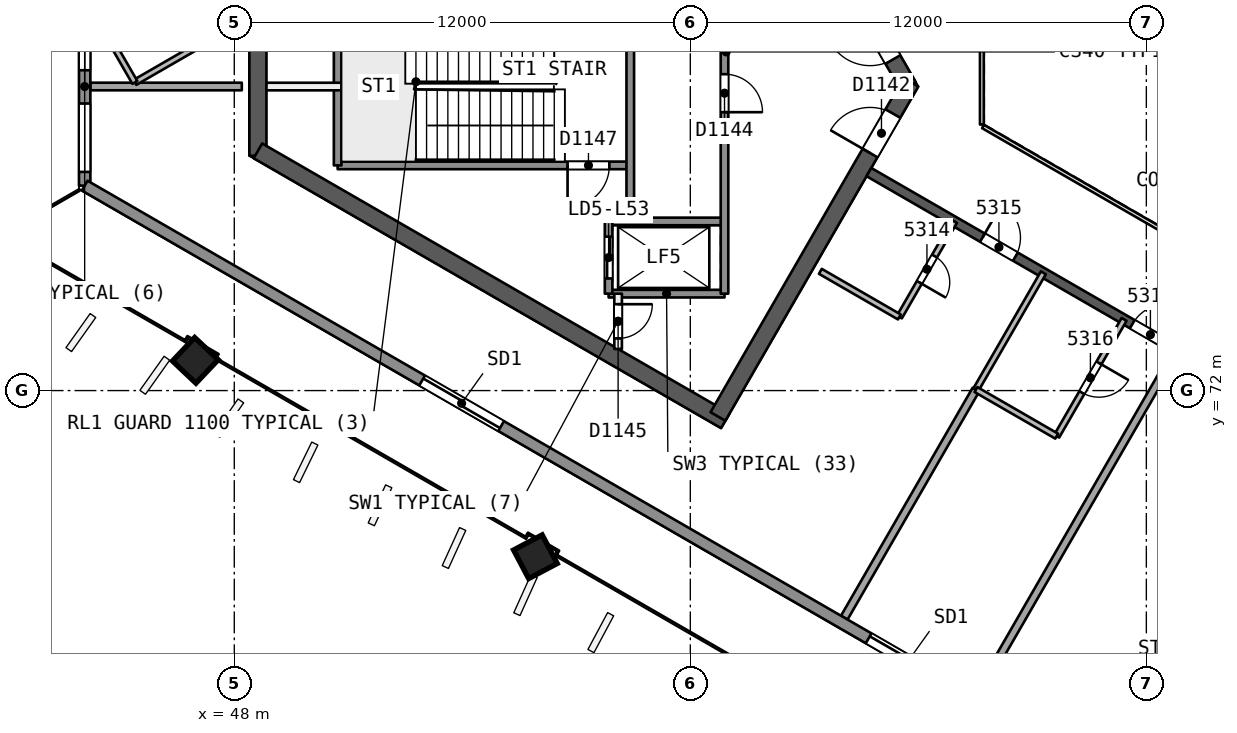
"""IFC4 building model, lengths in metres.
Left out: names, types, materials, properties, quantities, classifications, styles, units other than length and angle.
Written with IfcOpenShell. Run it as: python <this file> out.ifc"""

import sys

from ifc_helpers import new_model, si_unit, direction, frame, frame_2d, origin, origin_2d, place, context, subcontext, project, spatial, rectangle, extrude, element, fill, save


model = new_model("IFC4")
c1 = context("Model", 3, precision=1e-05, world=origin(), true_north=direction((0.0, 1.0)))
c2 = subcontext(c1, "Body", "Model", "MODEL_VIEW")
j1 = project(units=[si_unit("LENGTHUNIT", "METRE"), si_unit("PLANEANGLEUNIT", "RADIAN")], contexts=[c1])
p1 = place(None, origin())
s1 = spatial("IfcSite", under=j1, at=p1, CompositionType="ELEMENT")
p2 = place(p1, origin())
s2 = spatial("IfcBuilding", under=s1, at=p2, CompositionType="ELEMENT")
p3 = place(p2, frame((0.0, 0.0, 216.9)))
s3 = spatial("IfcBuildingStorey", under=s2, at=p3, CompositionType="ELEMENT", Elevation=216.9)
p4 = place(p3, frame((65.74, 80.0, 0.0), z_axis=(0.0, 0.0, 1.0), x_axis=(-0.499991857942, 0.866030104553, 0.0)))
e1 = element("IfcWall", 1, at=p4, inside=s3, PredefinedType="SHEAR", context=c2, shape_type="SweptSolid", body=[
    extrude(rectangle(XDim=10.25, YDim=0.45, at=frame_2d((5.125, 0.0))), origin(), (0.0, 0.0, 1.0), 3.7),
])
p5 = place(p4, frame((0.82, 0.0, 0.0)))
e2 = element("IfcOpeningElement", 2, at=p5, cuts=e1, PredefinedType="OPENING", context=c2, shape_type="SweptSolid", body=[
    extrude(rectangle(XDim=1.2, YDim=2.1, at=frame_2d((0.6, 1.05))), frame((0.0, 0.235, 0.0), z_axis=(0.0, -1.0, 0.0), x_axis=(1.0, 0.0, 0.0)), (0.0, 0.0, 1.0), 0.471),
])
p6 = place(p3, frame((48.622, 81.693, 0.0), z_axis=(0.0, 0.0, 1.0), x_axis=(0.0, -1.0, 0.0)))
e3 = element("IfcWall", 3, at=p6, inside=s3, PredefinedType="SHEAR", context=c2, shape_type="SweptSolid", body=[
    extrude(rectangle(XDim=3.515, YDim=0.45, at=frame_2d((1.758, 0.0))), origin(), (0.0, 0.0, 1.0), 3.7),
])
p7 = place(p3, frame((48.622, 78.307, 0.0), z_axis=(0.0, 0.0, 1.0), x_axis=(0.86602701116, -0.499997215934, 0.0)))
e4 = element("IfcWall", 4, at=p7, inside=s3, PredefinedType="SHEAR", context=c2, shape_type="SweptSolid", body=[
    extrude(rectangle(XDim=14.204, YDim=0.45, at=frame_2d((7.102, 0.0))), origin(), (0.0, 0.0, 1.0), 3.7),
])
p8 = place(p3, frame((60.728, 71.318, 0.0), z_axis=(0.0, 0.0, 1.0), x_axis=(0.500012416173, 0.866018235185, 0.0)))
e5 = element("IfcWall", 5, at=p8, inside=s3, PredefinedType="SHEAR", context=c2, shape_type="SweptSolid", body=[
    extrude(rectangle(XDim=10.155, YDim=0.45, at=frame_2d((5.078, 0.0))), origin(), (0.0, 0.0, 1.0), 3.7),
])
p9 = place(p8, frame((8.005, 0.0, 0.0)))
e6 = element("IfcOpeningElement", 6, at=p9, cuts=e5, PredefinedType="OPENING", context=c2, shape_type="SweptSolid", body=[
    extrude(rectangle(XDim=1.2, YDim=2.1, at=frame_2d((0.6, 1.05))), frame((0.0, 0.235, 0.0), z_axis=(0.0, -1.0, 0.0), x_axis=(1.0, 0.0, 0.0)), (0.0, 0.0, 1.0), 0.471),
])
p10 = place(p3, frame((64.7, 77.748, 0.0), z_axis=(0.0, 0.0, 1.0), x_axis=(0.866026492143, -0.499998114903, 0.0)))
e7 = element("IfcWall", 7, at=p10, inside=s3, PredefinedType="SHEAR", context=c2, shape_type="SweptSolid", body=[
    extrude(rectangle(XDim=15.588, YDim=0.25, at=frame_2d((7.794, 0.0))), origin(), (0.0, 0.0, 1.0), 3.3),
])
p11 = place(p10, frame((3.45, 0.0, 0.0)))
e8 = element("IfcOpeningElement", 8, at=p11, cuts=e7, PredefinedType="OPENING", context=c2, shape_type="SweptSolid", body=[
    extrude(rectangle(XDim=1.0, YDim=2.1, at=frame_2d((0.5, 1.05))), frame((0.0, 0.135, 0.0), z_axis=(0.0, -1.0, 0.0), x_axis=(1.0, 0.0, 0.0)), (0.0, 0.0, 1.0), 0.271),
])
p12 = place(p10, frame((8.003, 0.0, 0.0)))
e9 = element("IfcOpeningElement", 9, at=p12, cuts=e7, PredefinedType="OPENING", context=c2, shape_type="SweptSolid", body=[
    extrude(rectangle(XDim=1.1, YDim=2.1, at=frame_2d((0.55, 1.05))), frame((0.0, 0.135, 0.0), z_axis=(0.0, -1.0, 0.0), x_axis=(1.0, 0.0, 0.0)), (0.0, 0.0, 1.0), 0.271),
])
p13 = place(p10, frame((11.971, 0.0, 0.0)))
e10 = element("IfcOpeningElement", 10, at=p13, cuts=e7, PredefinedType="OPENING", context=c2, shape_type="SweptSolid", body=[
    extrude(rectangle(XDim=1.0, YDim=2.1, at=frame_2d((0.5, 1.05))), frame((0.0, 0.135, 0.0), z_axis=(0.0, -1.0, 0.0), x_axis=(1.0, 0.0, 0.0)), (0.0, 0.0, 1.0), 0.271),
])
p14 = place(p3, frame((46.94, 72.787, 0.0), z_axis=(0.028557219273, 0.006859008786, 0.999568626571), x_axis=(-0.86641042505, 0.498876758723, 0.021329673472)))
e11 = element("IfcColumn", 11, at=p14, inside=s3, PredefinedType="COLUMN", context=c2, shape_type="SweptSolid", body=[
    extrude(rectangle(XDim=0.85, YDim=0.85, at=origin_2d()), origin(), (0.0, 0.0, 1.0), 3.702),
])
p15 = place(p3, frame((55.901, 67.613, 0.0), z_axis=(0.019327242333, 0.012137244332, 0.999739538582), x_axis=(-0.865685903399, 0.500474062253, 0.01065972171)))
e12 = element("IfcColumn", 12, at=p15, inside=s3, PredefinedType="COLUMN", context=c2, shape_type="SweptSolid", body=[
    extrude(rectangle(XDim=0.85, YDim=0.85, at=origin_2d()), origin(), (0.0, 0.0, 1.0), 3.701),
])
p16 = place(p3, frame((47.636, 81.408, 0.0), z_axis=(0.0, 0.0, 1.0), x_axis=(-0.866021400173, -0.500006934395, 0.0)))
e13 = element("IfcWall", 13, at=p16, inside=s3, PredefinedType="PARTITIONING", context=c2, shape_type="SweptSolid", body=[
    extrude(rectangle(XDim=2.6, YDim=0.15, at=frame_2d((1.3, 0.0))), origin(), (0.0, 0.0, 1.0), 3.3),
])
p17 = place(p3, frame((45.384, 80.108, 0.0), z_axis=(0.0, 0.0, 1.0), x_axis=(-0.500025973189, 0.866010407637, 0.0)))
e14 = element("IfcWall", 14, at=p17, inside=s3, PredefinedType="PARTITIONING", context=c2, shape_type="SweptSolid", body=[
    extrude(rectangle(XDim=2.344, YDim=0.15, at=frame_2d((1.172, 0.0))), origin(), (0.0, 0.0, 1.0), 3.3),
])
p18 = place(p3, frame((44.212, 80.001, 0.0), z_axis=(0.0, 0.0, 1.0), x_axis=(1.0, 0.0, 0.0)))
e15 = element("IfcWall", 15, at=p18, inside=s3, PredefinedType="PARTITIONING", context=c2, shape_type="SweptSolid", body=[
    extrude(rectangle(XDim=3.986, YDim=0.2, at=frame_2d((1.993, 0.0))), origin(), (0.0, 0.0, 1.0), 3.3),
])
p19 = place(p3, frame((66.952, 76.448, 0.0), z_axis=(0.0, 0.0, 1.0), x_axis=(-0.499987231761, -0.866032775405, 0.0)))
e16 = element("IfcWall", 16, at=p19, inside=s3, PredefinedType="PARTITIONING", context=c2, shape_type="SweptSolid", body=[
    extrude(rectangle(XDim=2.9, YDim=0.15, at=frame_2d((1.45, 0.0))), origin(), (0.0, 0.0, 1.0), 3.3),
])
p20 = place(p19, frame((1.05, 0.0, 0.0)))
e17 = element("IfcOpeningElement", 17, at=p20, cuts=e16, PredefinedType="OPENING", context=c2, shape_type="SweptSolid", body=[
    extrude(rectangle(XDim=0.8, YDim=2.1, at=frame_2d((0.4, 1.05))), frame((0.0, 0.085, 0.0), z_axis=(0.0, -1.0, 0.0), x_axis=(1.0, 0.0, 0.0)), (0.0, 0.0, 1.0), 0.171),
])
p21 = place(p3, frame((65.502, 73.937, 0.0), z_axis=(0.0, 0.0, 1.0), x_axis=(-0.865994240961, 0.500053971709, 0.0)))
e18 = element("IfcWall", 18, at=p21, inside=s3, PredefinedType="PARTITIONING", context=c2, shape_type="SweptSolid", body=[
    extrude(rectangle(XDim=2.401, YDim=0.15, at=frame_2d((1.201, 0.0))), origin(), (0.0, 0.0, 1.0), 3.3),
])
p22 = place(p3, frame((64.051, 66.024, 0.0), z_axis=(0.0, 0.0, 1.0), x_axis=(0.499980616072, 0.866036594811, 0.0)))
e19 = element("IfcWall", 19, at=p22, inside=s3, PredefinedType="PARTITIONING", context=c2, shape_type="SweptSolid", body=[
    extrude(rectangle(XDim=6.931, YDim=0.2, at=frame_2d((3.465, 0.0))), origin(), (0.0, 0.0, 1.0), 3.3),
])
p23 = place(p3, frame((67.517, 72.027, 0.0), z_axis=(0.0, 0.0, 1.0), x_axis=(0.500018392462, 0.866014784631, 0.0)))
e20 = element("IfcWall", 20, at=p23, inside=s3, PredefinedType="PARTITIONING", context=c2, shape_type="SweptSolid", body=[
    extrude(rectangle(XDim=3.547, YDim=0.15, at=frame_2d((1.773, 0.0))), origin(), (0.0, 0.0, 1.0), 3.3),
])
p24 = place(p3, frame((71.414, 73.872, 0.0), z_axis=(0.0, 0.0, 1.0), x_axis=(-0.499966764714, -0.866044591335, 0.0)))
e21 = element("IfcWall", 21, at=p24, inside=s3, PredefinedType="PARTITIONING", context=c2, shape_type="SweptSolid", body=[
    extrude(rectangle(XDim=3.547, YDim=0.15, at=frame_2d((1.773, 0.0))), origin(), (0.0, 0.0, 1.0), 3.3),
])
p25 = place(p24, frame((1.323, 0.0, 0.0)))
e22 = element("IfcOpeningElement", 22, at=p25, cuts=e21, PredefinedType="OPENING", context=c2, shape_type="SweptSolid", body=[
    extrude(rectangle(XDim=0.9, YDim=2.1, at=frame_2d((0.45, 1.05))), frame((0.0, 0.085, 0.0), z_axis=(0.0, -1.0, 0.0), x_axis=(1.0, 0.0, 0.0)), (0.0, 0.0, 1.0), 0.171),
])
p26 = place(p3, frame((69.641, 70.8, 0.0), z_axis=(0.0, 0.0, 1.0), x_axis=(-0.866029801145, 0.49999238347, 0.0)))
e23 = element("IfcWall", 23, at=p26, inside=s3, PredefinedType="PARTITIONING", context=c2, shape_type="SweptSolid", body=[
    extrude(rectangle(XDim=2.453, YDim=0.15, at=frame_2d((1.227, 0.0))), origin(), (0.0, 0.0, 1.0), 3.3),
])
p27 = place(p3, frame((67.561, 63.998, 0.0), z_axis=(0.0, 0.0, 1.0), x_axis=(0.500010879287, 0.866019122534, 0.0)))
e24 = element("IfcWall", 24, at=p27, inside=s3, PredefinedType="PARTITIONING", context=c2, shape_type="SweptSolid", body=[
    extrude(rectangle(XDim=10.478, YDim=0.2, at=frame_2d((5.239, 0.0))), origin(), (0.0, 0.0, 1.0), 3.3),
])
p28 = place(p3, frame((44.063, 77.393, 0.0), z_axis=(0.0, 0.0, 1.0), x_axis=(0.0, 1.0, 0.0)))
e25 = element("IfcWall", 25, at=p28, inside=s3, PredefinedType="SOLIDWALL", context=c2, shape_type="SweptSolid", body=[
    extrude(rectangle(XDim=5.215, YDim=0.3, at=frame_2d((2.607, 0.0))), origin(), (0.0, 0.0, 1.0), 3.3),
])
p29 = place(p28, frame((3.036, 0.0, 0.9)))
e26 = element("IfcOpeningElement", 26, at=p29, cuts=e25, PredefinedType="OPENING", context=c2, shape_type="SweptSolid", body=[
    extrude(rectangle(XDim=1.8, YDim=1.5, at=frame_2d((0.9, 0.75))), frame((0.0, 0.161, 0.0), z_axis=(0.0, -1.0, 0.0), x_axis=(1.0, 0.0, 0.0)), (0.0, 0.0, 1.0), 0.321),
])
p30 = place(p28, frame((0.361, 0.0, 0.9)))
e27 = element("IfcOpeningElement", 27, at=p30, cuts=e25, PredefinedType="OPENING", context=c2, shape_type="SweptSolid", body=[
    extrude(rectangle(XDim=1.8, YDim=1.5, at=frame_2d((0.9, 0.75))), frame((0.0, 0.161, 0.0), z_axis=(0.0, -1.0, 0.0), x_axis=(1.0, 0.0, 0.0)), (0.0, 0.0, 1.0), 0.321),
])
p31 = place(p3, frame((88.21, 51.904, 0.0), z_axis=(0.0, 0.0, 1.0), x_axis=(-0.866024402399, 0.500001734447, 0.0)))
e28 = element("IfcWall", 28, at=p31, inside=s3, PredefinedType="SOLIDWALL", context=c2, shape_type="SweptSolid", body=[
    extrude(rectangle(XDim=50.977, YDim=0.3, at=frame_2d((25.488, 0.0))), origin(), (0.0, 0.0, 1.0), 3.3),
])
p32 = place(p31, frame((24.756, 0.0, 0.0)))
e29 = element("IfcOpeningElement", 29, at=p32, cuts=e28, PredefinedType="OPENING", context=c2, shape_type="SweptSolid", body=[
    extrude(rectangle(XDim=2.4, YDim=2.4, at=frame_2d((1.2, 1.2))), frame((0.0, 0.161, 0.0), z_axis=(0.0, -1.0, 0.0), x_axis=(1.0, 0.0, 0.0)), (0.0, 0.0, 1.0), 0.321),
])
p33 = place(p31, frame((19.612, 0.0, 0.0)))
e30 = element("IfcOpeningElement", 30, at=p33, cuts=e28, PredefinedType="OPENING", context=c2, shape_type="SweptSolid", body=[
    extrude(rectangle(XDim=2.4, YDim=2.4, at=frame_2d((1.2, 1.2))), frame((0.0, 0.161, 0.0), z_axis=(0.0, -1.0, 0.0), x_axis=(1.0, 0.0, 0.0)), (0.0, 0.0, 1.0), 0.321),
])
p34 = place(p31, frame((8.885, 0.0, 0.0)))
e31 = element("IfcOpeningElement", 31, at=p34, cuts=e28, PredefinedType="OPENING", context=c2, shape_type="SweptSolid", body=[
    extrude(rectangle(XDim=2.4, YDim=2.4, at=frame_2d((1.2, 1.2))), frame((0.0, 0.161, 0.0), z_axis=(0.0, -1.0, 0.0), x_axis=(1.0, 0.0, 0.0)), (0.0, 0.0, 1.0), 0.321),
])
p35 = place(p31, frame((38.323, 0.0, 0.0)))
e32 = element("IfcOpeningElement", 32, at=p35, cuts=e28, PredefinedType="OPENING", context=c2, shape_type="SweptSolid", body=[
    extrude(rectangle(XDim=2.4, YDim=2.4, at=frame_2d((1.2, 1.2))), frame((0.0, 0.161, 0.0), z_axis=(0.0, -1.0, 0.0), x_axis=(1.0, 0.0, 0.0)), (0.0, 0.0, 1.0), 0.321),
])
p36 = place(p3, frame((50.82, 80.0, 0.0), z_axis=(0.0, 0.0, 1.0), x_axis=(-1.0, 0.0, 0.0)))
e33 = element("IfcWall", 33, at=p36, inside=s3, PredefinedType="PARTITIONING", context=c2, shape_type="SweptSolid", body=[
    extrude(rectangle(XDim=1.973, YDim=0.2, at=frame_2d((0.987, 0.0))), origin(), (0.0, 0.0, 1.0), 3.3),
])
p37 = place(p3, frame((58.42, 77.925, 0.0), z_axis=(0.0, 0.0, 1.0), x_axis=(-1.0, 0.0, 0.0)))
e34 = element("IfcWall", 34, at=p37, inside=s3, PredefinedType="SOLIDWALL", context=c2, shape_type="SweptSolid", body=[
    extrude(rectangle(XDim=7.7, YDim=0.2, at=frame_2d((3.85, 0.0))), origin(), (0.0, 0.0, 1.0), 3.3),
])
p38 = place(p37, frame((0.55, 0.0, 0.0)))
e35 = element("IfcOpeningElement", 35, at=p38, cuts=e34, PredefinedType="OPENING", context=c2, shape_type="SweptSolid", body=[
    extrude(rectangle(XDim=1.1, YDim=2.1, at=frame_2d((0.55, 1.05))), frame((0.0, 0.11, 0.0), z_axis=(0.0, -1.0, 0.0), x_axis=(1.0, 0.0, 0.0)), (0.0, 0.0, 1.0), 0.221),
])
for number, where, z_axis, x_axis in (
    (36, (60.9, 76.45, 0.0), (0.0, 0.0, 1.0), (-1.0, 0.0, 0.0)),
    (37, (60.9, 74.55, 0.0), (0.0, 0.0, 1.0), (-1.0, 0.0, 0.0)),
):
    element("IfcWall", number, at=place(p3, frame(where, z_axis=z_axis, x_axis=x_axis)), inside=s3, PredefinedType="SOLIDWALL", context=c2, shape_type="SweptSolid", body=[
        extrude(rectangle(XDim=3.05, YDim=0.2, at=frame_2d((1.525, 0.0))), origin(), (0.0, 0.0, 1.0), 3.3),
    ])
p39 = place(p3, frame((60.9, 85.45, 0.0), z_axis=(0.0, 0.0, 1.0), x_axis=(0.0, -1.0, 0.0)))
e38 = element("IfcWall", 38, at=p39, inside=s3, PredefinedType="SOLIDWALL", context=c2, shape_type="SweptSolid", body=[
    extrude(rectangle(XDim=10.9, YDim=0.2, at=frame_2d((5.45, 0.0))), origin(), (0.0, 0.0, 1.0), 3.3),
])
p40 = place(p39, frame((0.625, 0.0, 0.0)))
e39 = element("IfcOpeningElement", 39, at=p40, cuts=e38, PredefinedType="OPENING", context=c2, shape_type="SweptSolid", body=[
    extrude(rectangle(XDim=1.0, YDim=2.1, at=frame_2d((0.5, 1.05))), frame((0.0, 0.11, 0.0), z_axis=(0.0, -1.0, 0.0), x_axis=(1.0, 0.0, 0.0)), (0.0, 0.0, 1.0), 0.221),
])
p41 = place(p39, frame((5.125, 0.0, 0.0)))
e40 = element("IfcOpeningElement", 40, at=p41, cuts=e38, PredefinedType="OPENING", context=c2, shape_type="SweptSolid", body=[
    extrude(rectangle(XDim=1.0, YDim=2.1, at=frame_2d((0.5, 1.05))), frame((0.0, 0.11, 0.0), z_axis=(0.0, -1.0, 0.0), x_axis=(1.0, 0.0, 0.0)), (0.0, 0.0, 1.0), 0.221),
])
p42 = place(p3, frame((58.42, 87.09, 0.0), z_axis=(0.0, 0.0, 1.0), x_axis=(0.0, -1.0, 0.0)))
e41 = element("IfcWall", 41, at=p42, inside=s3, PredefinedType="SOLIDWALL", context=c2, shape_type="SweptSolid", body=[
    extrude(rectangle(XDim=10.64, YDim=0.2, at=frame_2d((5.32, 0.0))), origin(), (0.0, 0.0, 1.0), 3.3),
])
p43 = place(p42, frame((0.37, 0.0, 0.0)))
e42 = element("IfcOpeningElement", 42, at=p43, cuts=e41, PredefinedType="OPENING", context=c2, shape_type="SweptSolid", body=[
    extrude(rectangle(XDim=0.9, YDim=2.1, at=frame_2d((0.45, 1.05))), frame((0.0, 0.11, 0.0), z_axis=(0.0, -1.0, 0.0), x_axis=(1.0, 0.0, 0.0)), (0.0, 0.0, 1.0), 0.221),
])
p44 = place(p3, frame((58.1, 74.55, 0.0), z_axis=(0.0, 0.0, 1.0), x_axis=(0.0, -1.0, 0.0)))
e43 = element("IfcWall", 43, at=p44, inside=s3, PredefinedType="PARTITIONING", context=c2, shape_type="SweptSolid", body=[
    extrude(rectangle(XDim=1.455, YDim=0.2, at=frame_2d((0.728, 0.0))), origin(), (0.0, 0.0, 1.0), 3.3),
])
p45 = place(p44, frame((0.278, 0.0, 0.0)))
e44 = element("IfcOpeningElement", 44, at=p45, cuts=e43, PredefinedType="OPENING", context=c2, shape_type="SweptSolid", body=[
    extrude(rectangle(XDim=0.9, YDim=2.1, at=frame_2d((0.45, 1.05))), frame((0.0, 0.11, 0.0), z_axis=(0.0, -1.0, 0.0), x_axis=(1.0, 0.0, 0.0)), (0.0, 0.0, 1.0), 0.221),
])
p46 = place(p3, frame((57.85, 76.45, 0.0), z_axis=(0.0, 0.0, 1.0), x_axis=(0.0, -1.0, 0.0)))
e45 = element("IfcWall", 45, at=p46, inside=s3, PredefinedType="SOLIDWALL", context=c2, shape_type="SweptSolid", body=[
    extrude(rectangle(XDim=1.9, YDim=0.2, at=frame_2d((0.95, 0.0))), origin(), (0.0, 0.0, 1.0), 3.3),
])
p47 = place(p46, frame((0.4, 0.0, 0.0)))
e46 = element("IfcOpeningElement", 46, at=p47, cuts=e45, PredefinedType="OPENING", context=c2, shape_type="SweptSolid", body=[
    extrude(rectangle(XDim=1.1, YDim=2.1, at=frame_2d((0.55, 1.05))), frame((0.0, 0.11, 0.0), z_axis=(0.0, -1.0, 0.0), x_axis=(1.0, 0.0, 0.0)), (0.0, 0.0, 1.0), 0.221),
])
p48 = place(p3, frame((50.72, 82.075, 0.0), z_axis=(0.0, 0.0, 1.0), x_axis=(0.0, -1.0, 0.0)))
e47 = element("IfcWall", 47, at=p48, inside=s3, PredefinedType="SOLIDWALL", context=c2, shape_type="SweptSolid", body=[
    extrude(rectangle(XDim=4.15, YDim=0.2, at=frame_2d((2.075, 0.0))), origin(), (0.0, 0.0, 1.0), 3.3),
])
p49 = place(p3, frame((67.672, 81.0, 0.0), z_axis=(0.0, 0.0, 1.0), x_axis=(0.0, -1.0, 0.0)))
e48 = element("IfcWall", 48, at=p49, inside=s3, PredefinedType="PARTITIONING", context=c2, shape_type="SweptSolid", body=[
    extrude(rectangle(XDim=2.0, YDim=0.1, at=frame_2d((1.0, 0.0))), origin(), (0.0, 0.0, 1.0), 3.3),
])
p50 = place(p3, frame((67.702, 78.948, 0.0), z_axis=(0.0, 0.0, 1.0), x_axis=(0.866026658274, -0.499997827154, 0.0)))
e49 = element("IfcWall", 49, at=p50, inside=s3, PredefinedType="PARTITIONING", context=c2, shape_type="SweptSolid", body=[
    extrude(rectangle(XDim=11.588, YDim=0.1, at=frame_2d((5.794, 0.0))), origin(), (0.0, 0.0, 1.0), 3.3),
])
p51 = place(p20, origin())
e50 = element("IfcDoor", 50, at=p51, inside=s3, OperationType="SINGLE_SWING_RIGHT", PredefinedType="NOTDEFINED", context=c2, shape_type="SweptSolid", body=[
    extrude(rectangle(XDim=0.8, YDim=2.1, at=frame_2d((0.4, 1.05))), frame((0.0, 0.025, 0.0), z_axis=(0.0, -1.0, 0.0), x_axis=(1.0, 0.0, 0.0)), (0.0, 0.0, 1.0), 0.05),
])
fill(e17, e50)
p52 = place(p11, origin())
e51 = element("IfcDoor", 51, at=p52, inside=s3, OperationType="SINGLE_SWING_LEFT", PredefinedType="NOTDEFINED", context=c2, shape_type="SweptSolid", body=[
    extrude(rectangle(XDim=1.0, YDim=2.1, at=frame_2d((0.5, 1.05))), frame((0.0, 0.025, 0.0), z_axis=(0.0, -1.0, 0.0), x_axis=(1.0, 0.0, 0.0)), (0.0, 0.0, 1.0), 0.05),
])
fill(e8, e51)
p53 = place(p25, origin())
e52 = element("IfcDoor", 52, at=p53, inside=s3, OperationType="SINGLE_SWING_LEFT", PredefinedType="NOTDEFINED", context=c2, shape_type="SweptSolid", body=[
    extrude(rectangle(XDim=0.9, YDim=2.1, at=frame_2d((0.45, 1.05))), frame((0.0, 0.025, 0.0), z_axis=(0.0, -1.0, 0.0), x_axis=(1.0, 0.0, 0.0)), (0.0, 0.0, 1.0), 0.05),
])
fill(e22, e52)
p54 = place(p12, origin())
e53 = element("IfcDoor", 53, at=p54, inside=s3, OperationType="SINGLE_SWING_RIGHT", PredefinedType="NOTDEFINED", context=c2, shape_type="SweptSolid", body=[
    extrude(rectangle(XDim=1.1, YDim=2.1, at=frame_2d((0.55, 1.05))), frame((0.0, 0.025, 0.0), z_axis=(0.0, -1.0, 0.0), x_axis=(1.0, 0.0, 0.0)), (0.0, 0.0, 1.0), 0.05),
])
fill(e9, e53)
p55 = place(p29, origin())
e54 = element("IfcWindow", 54, at=p55, inside=s3, PartitioningType="SINGLE_PANEL", PredefinedType="WINDOW", context=c2, shape_type="SweptSolid", body=[
    extrude(rectangle(XDim=1.8, YDim=1.5, at=frame_2d((0.9, 0.75))), frame((0.0, 0.03, 0.0), z_axis=(0.0, -1.0, 0.0), x_axis=(1.0, 0.0, 0.0)), (0.0, 0.0, 1.0), 0.06),
])
fill(e26, e54)
p56 = place(p30, origin())
e55 = element("IfcWindow", 55, at=p56, inside=s3, PartitioningType="SINGLE_PANEL", PredefinedType="WINDOW", context=c2, shape_type="SweptSolid", body=[
    extrude(rectangle(XDim=1.8, YDim=1.5, at=frame_2d((0.9, 0.75))), frame((0.0, 0.03, 0.0), z_axis=(0.0, -1.0, 0.0), x_axis=(1.0, 0.0, 0.0)), (0.0, 0.0, 1.0), 0.06),
])
fill(e27, e55)
p57 = place(p32, origin())
e56 = element("IfcDoor", 56, at=p57, inside=s3, OperationType="SLIDING_TO_LEFT", PredefinedType="NOTDEFINED", context=c2, shape_type="SweptSolid", body=[
    extrude(rectangle(XDim=2.4, YDim=2.4, at=frame_2d((1.2, 1.2))), frame((0.0, 0.025, 0.0), z_axis=(0.0, -1.0, 0.0), x_axis=(1.0, 0.0, 0.0)), (0.0, 0.0, 1.0), 0.05),
])
fill(e29, e56)
p58 = place(p35, origin())
e57 = element("IfcDoor", 57, at=p58, inside=s3, OperationType="SLIDING_TO_RIGHT", PredefinedType="NOTDEFINED", context=c2, shape_type="SweptSolid", body=[
    extrude(rectangle(XDim=2.4, YDim=2.4, at=frame_2d((1.2, 1.2))), frame((0.0, 0.025, 0.0), z_axis=(0.0, -1.0, 0.0), x_axis=(1.0, 0.0, 0.0)), (0.0, 0.0, 1.0), 0.05),
])
fill(e32, e57)
p59 = place(p5, origin())
e58 = element("IfcDoor", 58, at=p59, inside=s3, OperationType="SINGLE_SWING_RIGHT", PredefinedType="NOTDEFINED", context=c2, shape_type="SweptSolid", body=[
    extrude(rectangle(XDim=1.2, YDim=2.1, at=frame_2d((0.6, 1.05))), frame((0.0, 0.025, 0.0), z_axis=(0.0, -1.0, 0.0), x_axis=(1.0, 0.0, 0.0)), (0.0, 0.0, 1.0), 0.05),
])
fill(e2, e58)
p60 = place(p9, origin())
e59 = element("IfcDoor", 59, at=p60, inside=s3, OperationType="SINGLE_SWING_LEFT", PredefinedType="NOTDEFINED", context=c2, shape_type="SweptSolid", body=[
    extrude(rectangle(XDim=1.2, YDim=2.1, at=frame_2d((0.6, 1.05))), frame((0.0, 0.025, 0.0), z_axis=(0.0, -1.0, 0.0), x_axis=(1.0, 0.0, 0.0)), (0.0, 0.0, 1.0), 0.05),
])
fill(e6, e59)
p61 = place(p47, origin())
e60 = element("IfcDoor", 60, at=p61, inside=s3, OperationType="SLIDING_TO_RIGHT", PredefinedType="NOTDEFINED", context=c2, shape_type="SweptSolid", body=[
    extrude(rectangle(XDim=1.1, YDim=2.1, at=frame_2d((0.55, 1.05))), frame((0.0, 0.025, 0.0), z_axis=(0.0, -1.0, 0.0), x_axis=(1.0, 0.0, 0.0)), (0.0, 0.0, 1.0), 0.05),
])
fill(e46, e60)
p62 = place(p41, origin())
e61 = element("IfcDoor", 61, at=p62, inside=s3, OperationType="SINGLE_SWING_RIGHT", PredefinedType="NOTDEFINED", context=c2, shape_type="SweptSolid", body=[
    extrude(rectangle(XDim=1.0, YDim=2.1, at=frame_2d((0.5, 1.05))), frame((0.0, 0.025, 0.0), z_axis=(0.0, -1.0, 0.0), x_axis=(1.0, 0.0, 0.0)), (0.0, 0.0, 1.0), 0.05),
])
fill(e40, e61)
p63 = place(p45, origin())
e62 = element("IfcDoor", 62, at=p63, inside=s3, OperationType="SINGLE_SWING_LEFT", PredefinedType="NOTDEFINED", context=c2, shape_type="SweptSolid", body=[
    extrude(rectangle(XDim=0.9, YDim=2.1, at=frame_2d((0.45, 1.05))), frame((0.0, 0.025, 0.0), z_axis=(0.0, -1.0, 0.0), x_axis=(1.0, 0.0, 0.0)), (0.0, 0.0, 1.0), 0.05),
])
fill(e44, e62)
p64 = place(p38, origin())
e63 = element("IfcDoor", 63, at=p64, inside=s3, OperationType="SINGLE_SWING_RIGHT", PredefinedType="NOTDEFINED", context=c2, shape_type="SweptSolid", body=[
    extrude(rectangle(XDim=1.1, YDim=2.1, at=frame_2d((0.55, 1.05))), frame((0.0, 0.025, 0.0), z_axis=(0.0, -1.0, 0.0), x_axis=(1.0, 0.0, 0.0)), (0.0, 0.0, 1.0), 0.05),
])
fill(e35, e63)
save(model, sys.argv[1])
